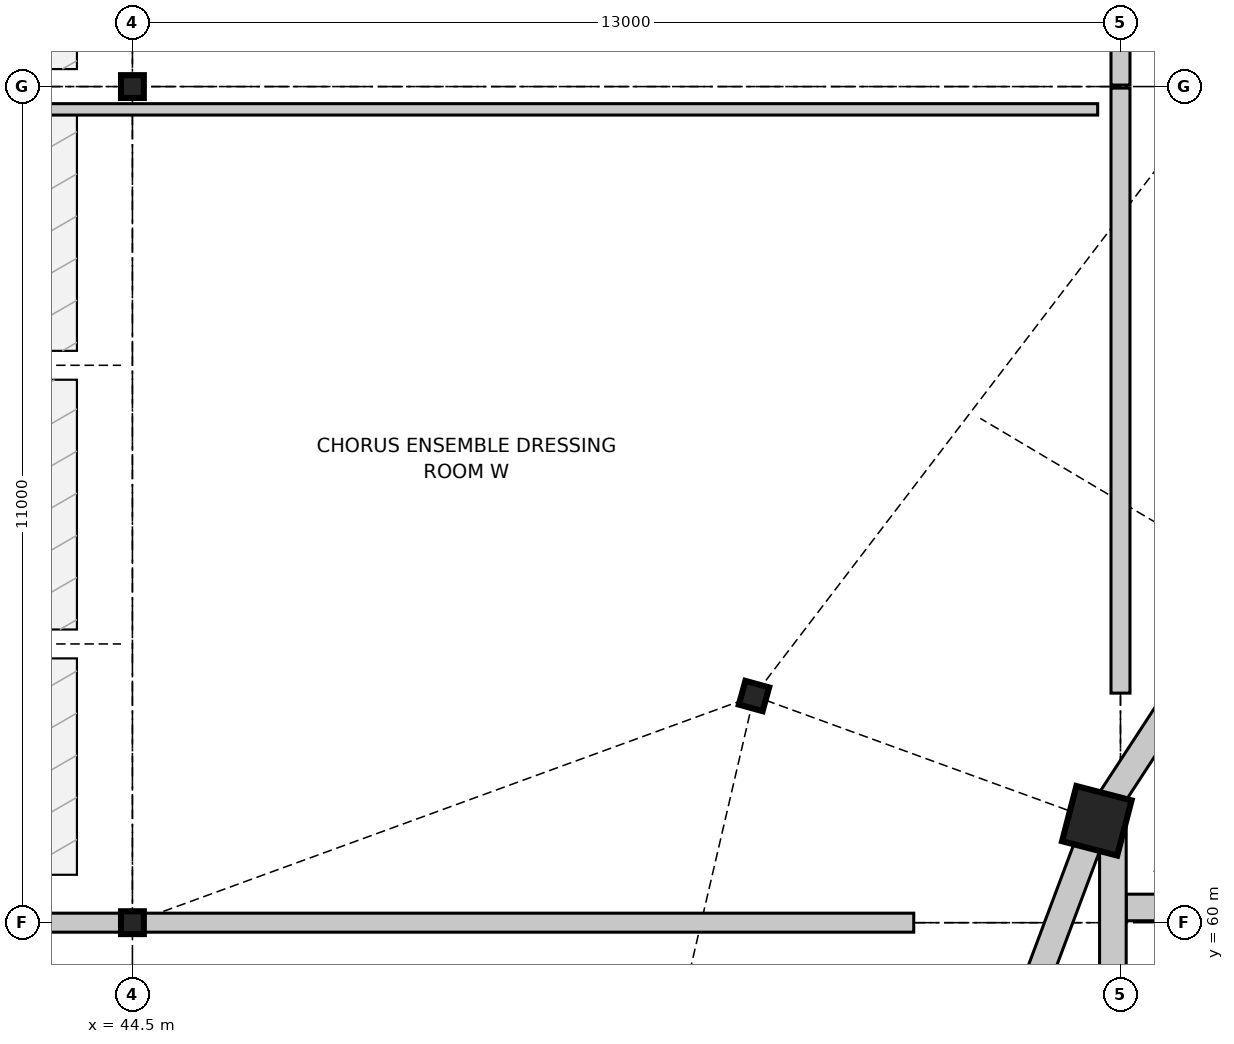
"""IFC4 building model, lengths in metres.
Left out: names, types, materials, properties, quantities, classifications, styles, units other than length and angle.
Written with IfcOpenShell. Run it as: python <this file> out.ifc"""

import sys

from ifc_helpers import new_model, si_unit, direction, frame, frame_2d, origin, origin_2d, place, context, subcontext, project, spatial, rectangle, hollow_circle, i_section, extrude, element, fill, save


model = new_model("IFC4")
c1 = context("Model", 3, precision=1e-05, world=origin(), true_north=direction((0.0, 1.0)))
c2 = subcontext(c1, "Body", "Model", "MODEL_VIEW")
j1 = project(units=[si_unit("LENGTHUNIT", "METRE"), si_unit("PLANEANGLEUNIT", "RADIAN")], contexts=[c1])
p1 = place(None, origin())
s1 = spatial("IfcSite", under=j1, at=p1, CompositionType="ELEMENT")
p2 = place(p1, origin())
s2 = spatial("IfcBuilding", under=s1, at=p2, CompositionType="ELEMENT")
p3 = place(p2, frame((0.0, 0.0, 9.6)))
s3 = spatial("IfcBuildingStorey", under=s2, at=p3, CompositionType="ELEMENT", Elevation=9.6)
p4 = place(p3, frame((52.678, 62.982, 0.0), z_axis=(0.0, 0.0, 1.0), x_axis=(-0.964141737836, 0.265387847052, 0.0)))
e1 = element("IfcColumn", 1, at=p4, inside=s3, PredefinedType="COLUMN", context=c2, shape_type="SweptSolid", body=[
    extrude(hollow_circle(Radius=0.162, WallThickness=0.02, at=origin_2d()), origin(), (0.0, 0.0, 1.0), 4.55),
])
p5 = place(p3, frame((57.189, 61.34, 0.0), z_axis=(0.0, 0.0, 1.0), x_axis=(-0.967841021032, 0.251562632376, 0.0)))
e2 = element("IfcColumn", 2, at=p5, inside=s3, PredefinedType="COLUMN", context=c2, shape_type="SweptSolid", body=[
    extrude(rectangle(XDim=0.75, YDim=0.75, at=origin_2d()), origin(), (0.0, 0.0, 1.0), 4.8),
])
for number, where, z_axis, x_axis in (
    (3, (44.5, 60.0, 0.0), (0.0, 0.0, 1.0), (1.0, 0.0, 0.0)),
    (4, (44.5, 71.0, 0.0), (0.0, 0.0, 1.0), (1.0, 0.0, 0.0)),
):
    element("IfcColumn", number, at=place(p3, frame(where, z_axis=z_axis, x_axis=x_axis)), inside=s3, PredefinedType="COLUMN", context=c2, shape_type="SweptSolid", body=[
        extrude(i_section(OverallWidth=0.3, OverallDepth=0.3, WebThickness=0.011, FlangeThickness=0.019, FilletRadius=0.027, at=origin_2d()), origin(), (0.0, 0.0, 1.0), 4.8),
    ])
p6 = place(p3, frame((59.251, 64.5, 0.0), z_axis=(0.0, 0.0, 1.0), x_axis=(-0.546611158382, -0.837386554425, 0.0)))
e5 = element("IfcWall", 5, at=p6, inside=s3, PredefinedType="SHEAR", context=c2, shape_type="SweptSolid", body=[
    extrude(rectangle(XDim=3.773, YDim=0.35, at=frame_2d((1.887, 0.0))), origin(), (0.0, 0.0, 1.0), 4.55),
])
p7 = place(p3, frame((57.189, 61.34, 0.0), z_axis=(0.0, 0.0, 1.0), x_axis=(-0.351279653979, -0.936270583058, 0.0)))
e6 = element("IfcWall", 6, at=p7, inside=s3, PredefinedType="SHEAR", context=c2, shape_type="SweptSolid", body=[
    extrude(rectangle(XDim=3.597, YDim=0.35, at=frame_2d((1.798, 0.0))), origin(), (0.0, 0.0, 1.0), 4.55),
])
p8 = place(p3, frame((44.48, 60.0, 0.0), z_axis=(0.0, 0.0, 1.0), x_axis=(-1.0, 0.0, 0.0)))
e7 = element("IfcWall", 7, at=p8, inside=s3, PredefinedType="SOLIDWALL", context=c2, shape_type="SweptSolid", body=[
    extrude(rectangle(XDim=12.96, YDim=0.25, at=frame_2d((6.48, 0.0))), origin(), (0.0, 0.0, 1.0), 3.888),
])
p9 = place(p8, frame((5.18, 0.0, 1.5)))
e8 = element("IfcOpeningElement", 8, at=p9, cuts=e7, PredefinedType="OPENING", context=c2, shape_type="SweptSolid", body=[
    extrude(rectangle(XDim=2.6, YDim=1.05, at=frame_2d((1.3, 0.525))), frame((0.0, 0.135, 0.0), z_axis=(0.0, -1.0, 0.0), x_axis=(1.0, 0.0, 0.0)), (0.0, 0.0, 1.0), 0.27),
])
p10 = place(p3, frame((54.78, 60.0, 0.0), z_axis=(0.0, 0.0, 1.0), x_axis=(-1.0, 0.0, 0.0)))
e9 = element("IfcWall", 9, at=p10, inside=s3, PredefinedType="SOLIDWALL", context=c2, shape_type="SweptSolid", body=[
    extrude(rectangle(XDim=10.26, YDim=0.25, at=frame_2d((5.13, 0.0))), origin(), (0.0, 0.0, 1.0), 3.988),
])
p11 = place(p10, frame((4.53, 0.0, 0.9)))
e10 = element("IfcOpeningElement", 10, at=p11, cuts=e9, PredefinedType="OPENING", context=c2, shape_type="SweptSolid", body=[
    extrude(rectangle(XDim=1.2, YDim=1.55, at=frame_2d((0.6, 0.775))), frame((0.0, 0.135, 0.0), z_axis=(0.0, -1.0, 0.0), x_axis=(1.0, 0.0, 0.0)), (0.0, 0.0, 1.0), 0.27),
])
p12 = place(p3, frame((57.5, 70.98, 0.0), z_axis=(0.0, 0.0, 1.0), x_axis=(0.0, -1.0, 0.0)))
e11 = element("IfcWall", 11, at=p12, inside=s3, PredefinedType="SOLIDWALL", context=c2, shape_type="SweptSolid", body=[
    extrude(rectangle(XDim=7.96, YDim=0.25, at=frame_2d((3.98, 0.0))), origin(), (0.0, 0.0, 1.0), 4.028),
])
p13 = place(p12, frame((3.305, 0.0, 0.9)))
e12 = element("IfcOpeningElement", 12, at=p13, cuts=e11, PredefinedType="OPENING", context=c2, shape_type="SweptSolid", body=[
    extrude(rectangle(XDim=1.35, YDim=1.55, at=frame_2d((0.675, 0.775))), frame((0.0, 0.135, 0.0), z_axis=(0.0, -1.0, 0.0), x_axis=(1.0, 0.0, 0.0)), (0.0, 0.0, 1.0), 0.27),
])
p14 = place(p3, frame((57.5, 81.98, 0.0), z_axis=(0.0, 0.0, 1.0), x_axis=(0.0, -1.0, 0.0)))
e13 = element("IfcWall", 13, at=p14, inside=s3, PredefinedType="SOLIDWALL", context=c2, shape_type="SweptSolid", body=[
    extrude(rectangle(XDim=10.96, YDim=0.25, at=frame_2d((5.48, 0.0))), origin(), (0.0, 0.0, 1.0), 4.028),
])
p15 = place(p14, frame((4.73, 0.0, 0.9)))
e14 = element("IfcOpeningElement", 14, at=p15, cuts=e13, PredefinedType="OPENING", context=c2, shape_type="SweptSolid", body=[
    extrude(rectangle(XDim=1.5, YDim=1.55, at=frame_2d((0.75, 0.775))), frame((0.0, 0.135, 0.0), z_axis=(0.0, -1.0, 0.0), x_axis=(1.0, 0.0, 0.0)), (0.0, 0.0, 1.0), 0.27),
])
p16 = place(p3, frame((57.575, 60.2, 0.0), z_axis=(0.0, 0.0, 1.0), x_axis=(1.0, 0.0, 0.0)))
e15 = element("IfcWall", 15, at=p16, inside=s3, PredefinedType="SHEAR", context=c2, shape_type="SweptSolid", body=[
    extrude(rectangle(XDim=6.45, YDim=0.35, at=frame_2d((3.225, 0.0))), origin(), (0.0, 0.0, 1.0), 4.55),
])
p17 = place(p16, frame((1.15, 0.0, 0.0)))
e16 = element("IfcOpeningElement", 16, at=p17, cuts=e15, PredefinedType="OPENING", context=c2, shape_type="SweptSolid", body=[
    extrude(rectangle(XDim=1.35, YDim=2.2, at=frame_2d((0.675, 1.1))), frame((0.0, 0.185, 0.0), z_axis=(0.0, -1.0, 0.0), x_axis=(1.0, 0.0, 0.0)), (0.0, 0.0, 1.0), 0.37),
])
p18 = place(p16, frame((5.28, 0.0, 0.0)))
e17 = element("IfcOpeningElement", 17, at=p18, cuts=e15, PredefinedType="OPENING", context=c2, shape_type="SweptSolid", body=[
    extrude(rectangle(XDim=0.95, YDim=2.12, at=frame_2d((0.475, 1.06))), frame((0.0, 0.185, 0.0), z_axis=(0.0, -1.0, 0.0), x_axis=(1.0, 0.0, 0.0)), (0.0, 0.0, 1.0), 0.37),
])
p19 = place(p3, frame((57.4, 48.775, 0.0), z_axis=(0.0, 0.0, 1.0), x_axis=(0.0, 1.0, 0.0)))
e18 = element("IfcWall", 18, at=p19, inside=s3, PredefinedType="SHEAR", context=c2, shape_type="SweptSolid", body=[
    extrude(rectangle(XDim=12.565, YDim=0.35, at=frame_2d((6.283, 0.0))), origin(), (0.0, 0.0, 1.0), 4.55),
])
p20 = place(p3, frame((42.3, 70.7, 0.0), z_axis=(0.0, 0.0, 1.0), x_axis=(1.0, 0.0, 0.0)))
e19 = element("IfcWall", 19, at=p20, inside=s3, PredefinedType="PARTITIONING", context=c2, shape_type="SweptSolid", body=[
    extrude(rectangle(XDim=14.9, YDim=0.15, at=frame_2d((7.45, 0.0))), origin(), (0.0, 0.0, 1.0), 4.09),
])
p21 = place(p20, frame((6.925, 0.0, 0.0)))
e20 = element("IfcOpeningElement", 20, at=p21, cuts=e19, PredefinedType="OPENING", context=c2, shape_type="SweptSolid", body=[
    extrude(rectangle(XDim=1.05, YDim=2.15, at=frame_2d((0.525, 1.075))), frame((0.0, 0.085, 0.0), z_axis=(0.0, -1.0, 0.0), x_axis=(1.0, 0.0, 0.0)), (0.0, 0.0, 1.0), 0.17),
])
p22 = place(p11, origin())
e21 = element("IfcWindow", 21, at=p22, inside=s3, PartitioningType="SINGLE_PANEL", PredefinedType="WINDOW", context=c2, shape_type="SweptSolid", body=[
    extrude(rectangle(XDim=1.2, YDim=1.55, at=frame_2d((0.6, 0.775))), frame((0.0, 0.03, 0.0), z_axis=(0.0, -1.0, 0.0), x_axis=(1.0, 0.0, 0.0)), (0.0, 0.0, 1.0), 0.06),
])
fill(e10, e21)
p23 = place(p13, origin())
e22 = element("IfcWindow", 22, at=p23, inside=s3, PartitioningType="SINGLE_PANEL", PredefinedType="WINDOW", context=c2, shape_type="SweptSolid", body=[
    extrude(rectangle(XDim=1.35, YDim=1.55, at=frame_2d((0.675, 0.775))), frame((0.0, 0.03, 0.0), z_axis=(0.0, -1.0, 0.0), x_axis=(1.0, 0.0, 0.0)), (0.0, 0.0, 1.0), 0.06),
])
fill(e12, e22)
p24 = place(p21, origin())
e23 = element("IfcDoor", 23, at=p24, inside=s3, OperationType="SINGLE_SWING_LEFT", PredefinedType="DOOR", context=c2, shape_type="SweptSolid", body=[
    extrude(rectangle(XDim=1.05, YDim=2.15, at=frame_2d((0.525, 1.075))), frame((0.0, 0.025, 0.0), z_axis=(0.0, -1.0, 0.0), x_axis=(1.0, 0.0, 0.0)), (0.0, 0.0, 1.0), 0.05),
])
fill(e20, e23)
save(model, sys.argv[1])
